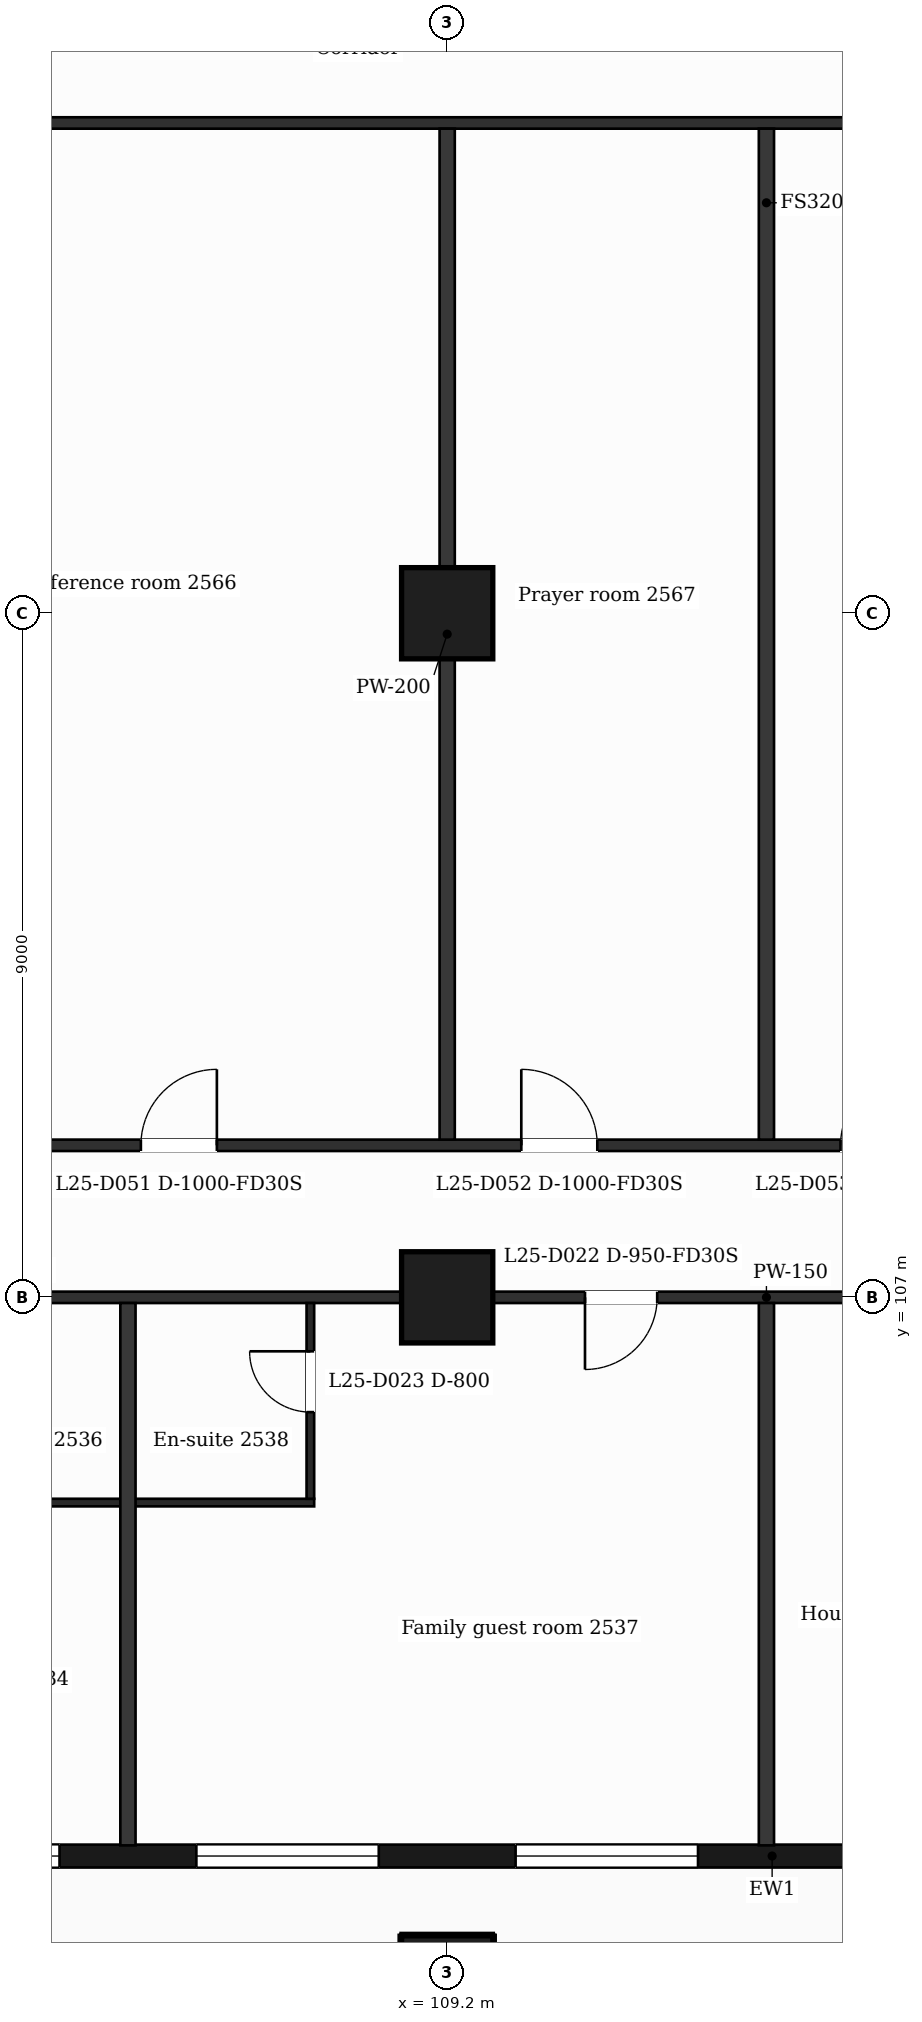
"""IFC4 building model, lengths in metres.
Left out: names, types, materials, properties, quantities, classifications, styles, units other than length and angle.
Written with IfcOpenShell. Run it as: python <this file> out.ifc"""

import sys

from ifc_helpers import new_model, si_unit, direction, frame, frame_2d, origin, origin_2d, place, context, subcontext, project, spatial, rectangle, extrude, element, fill, save


model = new_model("IFC4")
c1 = context("Model", 3, precision=1e-05, world=origin(), true_north=direction((0.0, 1.0)))
c2 = subcontext(c1, "Body", "Model", "MODEL_VIEW")
j1 = project(units=[si_unit("LENGTHUNIT", "METRE"), si_unit("PLANEANGLEUNIT", "RADIAN")], contexts=[c1])
p1 = place(None, origin())
s1 = spatial("IfcSite", under=j1, at=p1, CompositionType="ELEMENT")
p2 = place(p1, origin())
s2 = spatial("IfcBuilding", under=s1, at=p2, CompositionType="ELEMENT")
p3 = place(p2, frame((0.0, 0.0, 109.5)))
s3 = spatial("IfcBuildingStorey", under=s2, at=p3, CompositionType="ELEMENT", Elevation=109.5)
for number, where, z_axis, x_axis in (
    (1, (109.2, 98.0, 0.0), (0.0, 0.0, 1.0), (1.0, 0.0, 0.0)),
    (2, (109.2, 107.0, 0.0), (0.0, 0.0, 1.0), (1.0, 0.0, 0.0)),
    (3, (109.2, 116.0, 0.0), (0.0, 0.0, 1.0), (1.0, 0.0, 0.0)),
):
    element("IfcColumn", number, at=place(p3, frame(where, z_axis=z_axis, x_axis=x_axis)), inside=s3, PredefinedType="COLUMN", context=c2, shape_type="SweptSolid", body=[
        extrude(rectangle(XDim=1.2, YDim=1.2, at=origin_2d()), origin(), (0.0, 0.0, 1.0), 3.7),
    ])
p4 = place(p3, frame((89.85, 99.65, 0.0), z_axis=(0.0, 0.0, 1.0), x_axis=(1.0, 0.0, 0.0)))
e4 = element("IfcWall", 4, at=p4, inside=s3, PredefinedType="SOLIDWALL", context=c2, shape_type="SweptSolid", body=[
    extrude(rectangle(XDim=47.25, YDim=0.3, at=frame_2d((23.625, 0.0))), origin(), (0.0, 0.0, 1.0), 3.38),
])
p5 = place(p4, frame((0.725, 0.0, 0.9)))
e5 = element("IfcOpeningElement", 5, at=p5, cuts=e4, PredefinedType="OPENING", context=c2, shape_type="SweptSolid", body=[
    extrude(rectangle(XDim=1.2, YDim=2.1, at=frame_2d((0.6, 1.05))), frame((0.0, 0.16, 0.0), z_axis=(0.0, -1.0, 0.0), x_axis=(1.0, 0.0, 0.0)), (0.0, 0.0, 1.0), 0.32),
])
p6 = place(p4, frame((3.45, 0.0, 0.9)))
e6 = element("IfcOpeningElement", 6, at=p6, cuts=e4, PredefinedType="OPENING", context=c2, shape_type="SweptSolid", body=[
    extrude(rectangle(XDim=2.4, YDim=2.1, at=frame_2d((1.2, 1.05))), frame((0.0, 0.16, 0.0), z_axis=(0.0, -1.0, 0.0), x_axis=(1.0, 0.0, 0.0)), (0.0, 0.0, 1.0), 0.32),
])
p7 = place(p4, frame((7.65, 0.0, 0.9)))
e7 = element("IfcOpeningElement", 7, at=p7, cuts=e4, PredefinedType="OPENING", context=c2, shape_type="SweptSolid", body=[
    extrude(rectangle(XDim=2.4, YDim=2.1, at=frame_2d((1.2, 1.05))), frame((0.0, 0.16, 0.0), z_axis=(0.0, -1.0, 0.0), x_axis=(1.0, 0.0, 0.0)), (0.0, 0.0, 1.0), 0.32),
])
p8 = place(p4, frame((11.85, 0.0, 0.9)))
e8 = element("IfcOpeningElement", 8, at=p8, cuts=e4, PredefinedType="OPENING", context=c2, shape_type="SweptSolid", body=[
    extrude(rectangle(XDim=2.4, YDim=2.1, at=frame_2d((1.2, 1.05))), frame((0.0, 0.16, 0.0), z_axis=(0.0, -1.0, 0.0), x_axis=(1.0, 0.0, 0.0)), (0.0, 0.0, 1.0), 0.32),
])
p9 = place(p4, frame((16.05, 0.0, 0.9)))
e9 = element("IfcOpeningElement", 9, at=p9, cuts=e4, PredefinedType="OPENING", context=c2, shape_type="SweptSolid", body=[
    extrude(rectangle(XDim=2.4, YDim=2.1, at=frame_2d((1.2, 1.05))), frame((0.0, 0.16, 0.0), z_axis=(0.0, -1.0, 0.0), x_axis=(1.0, 0.0, 0.0)), (0.0, 0.0, 1.0), 0.32),
])
p10 = place(p4, frame((20.25, 0.0, 0.9)))
e10 = element("IfcOpeningElement", 10, at=p10, cuts=e4, PredefinedType="OPENING", context=c2, shape_type="SweptSolid", body=[
    extrude(rectangle(XDim=2.4, YDim=2.1, at=frame_2d((1.2, 1.05))), frame((0.0, 0.16, 0.0), z_axis=(0.0, -1.0, 0.0), x_axis=(1.0, 0.0, 0.0)), (0.0, 0.0, 1.0), 0.32),
])
p11 = place(p4, frame((25.05, 0.0, 0.9)))
e11 = element("IfcOpeningElement", 11, at=p11, cuts=e4, PredefinedType="OPENING", context=c2, shape_type="SweptSolid", body=[
    extrude(rectangle(XDim=1.2, YDim=2.1, at=frame_2d((0.6, 1.05))), frame((0.0, 0.16, 0.0), z_axis=(0.0, -1.0, 0.0), x_axis=(1.0, 0.0, 0.0)), (0.0, 0.0, 1.0), 0.32),
])
p12 = place(p4, frame((29.25, 0.0, 0.9)))
e12 = element("IfcOpeningElement", 12, at=p12, cuts=e4, PredefinedType="OPENING", context=c2, shape_type="SweptSolid", body=[
    extrude(rectangle(XDim=1.2, YDim=2.1, at=frame_2d((0.6, 1.05))), frame((0.0, 0.16, 0.0), z_axis=(0.0, -1.0, 0.0), x_axis=(1.0, 0.0, 0.0)), (0.0, 0.0, 1.0), 0.32),
])
p13 = place(p4, frame((32.55, 0.0, 0.0)))
e13 = element("IfcOpeningElement", 13, at=p13, cuts=e4, PredefinedType="OPENING", context=c2, shape_type="SweptSolid", body=[
    extrude(rectangle(XDim=1.2, YDim=2.4, at=frame_2d((0.6, 1.2))), frame((0.0, 0.16, 0.0), z_axis=(0.0, -1.0, 0.0), x_axis=(1.0, 0.0, 0.0)), (0.0, 0.0, 1.0), 0.32),
])
p14 = place(p4, frame((34.35, 0.0, 0.9)))
e14 = element("IfcOpeningElement", 14, at=p14, cuts=e4, PredefinedType="OPENING", context=c2, shape_type="SweptSolid", body=[
    extrude(rectangle(XDim=1.2, YDim=2.1, at=frame_2d((0.6, 1.05))), frame((0.0, 0.16, 0.0), z_axis=(0.0, -1.0, 0.0), x_axis=(1.0, 0.0, 0.0)), (0.0, 0.0, 1.0), 0.32),
])
p15 = place(p4, frame((37.05, 0.0, 0.9)))
e15 = element("IfcOpeningElement", 15, at=p15, cuts=e4, PredefinedType="OPENING", context=c2, shape_type="SweptSolid", body=[
    extrude(rectangle(XDim=2.4, YDim=2.1, at=frame_2d((1.2, 1.05))), frame((0.0, 0.16, 0.0), z_axis=(0.0, -1.0, 0.0), x_axis=(1.0, 0.0, 0.0)), (0.0, 0.0, 1.0), 0.32),
])
p16 = place(p4, frame((40.95, 0.0, 0.0)))
e16 = element("IfcOpeningElement", 16, at=p16, cuts=e4, PredefinedType="OPENING", context=c2, shape_type="SweptSolid", body=[
    extrude(rectangle(XDim=1.2, YDim=2.4, at=frame_2d((0.6, 1.2))), frame((0.0, 0.16, 0.0), z_axis=(0.0, -1.0, 0.0), x_axis=(1.0, 0.0, 0.0)), (0.0, 0.0, 1.0), 0.32),
])
p17 = place(p4, frame((42.75, 0.0, 0.9)))
e17 = element("IfcOpeningElement", 17, at=p17, cuts=e4, PredefinedType="OPENING", context=c2, shape_type="SweptSolid", body=[
    extrude(rectangle(XDim=1.2, YDim=2.1, at=frame_2d((0.6, 1.05))), frame((0.0, 0.16, 0.0), z_axis=(0.0, -1.0, 0.0), x_axis=(1.0, 0.0, 0.0)), (0.0, 0.0, 1.0), 0.32),
])
p18 = place(p4, frame((45.25, 0.0, 0.9)))
e18 = element("IfcOpeningElement", 18, at=p18, cuts=e4, PredefinedType="OPENING", context=c2, shape_type="SweptSolid", body=[
    extrude(rectangle(XDim=1.2, YDim=2.1, at=frame_2d((0.6, 1.05))), frame((0.0, 0.16, 0.0), z_axis=(0.0, -1.0, 0.0), x_axis=(1.0, 0.0, 0.0)), (0.0, 0.0, 1.0), 0.32),
])
p19 = place(p3, frame((102.55, 104.3, 0.0), z_axis=(0.0, 0.0, 1.0), x_axis=(1.0, 0.0, 0.0)))
e19 = element("IfcWall", 19, at=p19, inside=s3, PredefinedType="PARTITIONING", context=c2, shape_type="SweptSolid", body=[
    extrude(rectangle(XDim=4.9, YDim=0.1, at=frame_2d((2.45, 0.0))), origin(), (0.0, 0.0, 1.0), 3.38),
])
p20 = place(p3, frame((87.018, 107.0, 0.0), z_axis=(0.0, 0.0, 1.0), x_axis=(1.0, 0.0, 0.0)))
e20 = element("IfcWall", 20, at=p20, inside=s3, PredefinedType="PARTITIONING", context=c2, shape_type="SweptSolid", body=[
    extrude(rectangle(XDim=52.765, YDim=0.15, at=frame_2d((26.382, 0.0))), origin(), (0.0, 0.0, 1.0), 3.38),
])
p21 = place(p20, frame((1.032, 0.0, 0.0)))
e21 = element("IfcOpeningElement", 21, at=p21, cuts=e20, PredefinedType="OPENING", context=c2, shape_type="SweptSolid", body=[
    extrude(rectangle(XDim=0.95, YDim=2.1, at=frame_2d((0.475, 1.05))), frame((0.0, 0.085, 0.0), z_axis=(0.0, -1.0, 0.0), x_axis=(1.0, 0.0, 0.0)), (0.0, 0.0, 1.0), 0.17),
])
p22 = place(p20, frame((9.752, 0.0, 0.0)))
e22 = element("IfcOpeningElement", 22, at=p22, cuts=e20, PredefinedType="OPENING", context=c2, shape_type="SweptSolid", body=[
    extrude(rectangle(XDim=1.0, YDim=2.1, at=frame_2d((0.5, 1.05))), frame((0.0, 0.085, 0.0), z_axis=(0.0, -1.0, 0.0), x_axis=(1.0, 0.0, 0.0)), (0.0, 0.0, 1.0), 0.17),
])
p23 = place(p20, frame((23.995, 0.0, 0.0)))
e23 = element("IfcOpeningElement", 23, at=p23, cuts=e20, PredefinedType="OPENING", context=c2, shape_type="SweptSolid", body=[
    extrude(rectangle(XDim=0.95, YDim=2.1, at=frame_2d((0.475, 1.05))), frame((0.0, 0.085, 0.0), z_axis=(0.0, -1.0, 0.0), x_axis=(1.0, 0.0, 0.0)), (0.0, 0.0, 1.0), 0.17),
])
p24 = place(p20, frame((28.645, 0.0, 0.0)))
e24 = element("IfcOpeningElement", 24, at=p24, cuts=e20, PredefinedType="OPENING", context=c2, shape_type="SweptSolid", body=[
    extrude(rectangle(XDim=0.95, YDim=2.1, at=frame_2d((0.475, 1.05))), frame((0.0, 0.085, 0.0), z_axis=(0.0, -1.0, 0.0), x_axis=(1.0, 0.0, 0.0)), (0.0, 0.0, 1.0), 0.17),
])
p25 = place(p20, frame((36.632, 0.0, 0.0)))
e25 = element("IfcOpeningElement", 25, at=p25, cuts=e20, PredefinedType="OPENING", context=c2, shape_type="SweptSolid", body=[
    extrude(rectangle(XDim=1.0, YDim=2.1, at=frame_2d((0.5, 1.05))), frame((0.0, 0.085, 0.0), z_axis=(0.0, -1.0, 0.0), x_axis=(1.0, 0.0, 0.0)), (0.0, 0.0, 1.0), 0.17),
])
p26 = place(p20, frame((41.957, 0.0, 0.0)))
e26 = element("IfcOpeningElement", 26, at=p26, cuts=e20, PredefinedType="OPENING", context=c2, shape_type="SweptSolid", body=[
    extrude(rectangle(XDim=0.95, YDim=2.1, at=frame_2d((0.475, 1.05))), frame((0.0, 0.085, 0.0), z_axis=(0.0, -1.0, 0.0), x_axis=(1.0, 0.0, 0.0)), (0.0, 0.0, 1.0), 0.17),
])
p27 = place(p20, frame((45.607, 0.0, 0.0)))
e27 = element("IfcOpeningElement", 27, at=p27, cuts=e20, PredefinedType="OPENING", context=c2, shape_type="SweptSolid", body=[
    extrude(rectangle(XDim=0.95, YDim=2.1, at=frame_2d((0.475, 1.05))), frame((0.0, 0.085, 0.0), z_axis=(0.0, -1.0, 0.0), x_axis=(1.0, 0.0, 0.0)), (0.0, 0.0, 1.0), 0.17),
])
p28 = place(p20, frame((48.767, 0.0, 0.0)))
e28 = element("IfcOpeningElement", 28, at=p28, cuts=e20, PredefinedType="OPENING", context=c2, shape_type="SweptSolid", body=[
    extrude(rectangle(XDim=0.95, YDim=2.1, at=frame_2d((0.475, 1.05))), frame((0.0, 0.085, 0.0), z_axis=(0.0, -1.0, 0.0), x_axis=(1.0, 0.0, 0.0)), (0.0, 0.0, 1.0), 0.17),
])
p29 = place(p3, frame((100.725, 109.0, 0.0), z_axis=(0.0, 0.0, 1.0), x_axis=(1.0, 0.0, 0.0)))
e29 = element("IfcWall", 29, at=p29, inside=s3, PredefinedType="PARTITIONING", context=c2, shape_type="SweptSolid", body=[
    extrude(rectangle(XDim=25.35, YDim=0.15, at=frame_2d((12.675, 0.0))), origin(), (0.0, 0.0, 1.0), 3.38),
])
p30 = place(p29, frame((4.445, 0.0, 0.0)))
e30 = element("IfcOpeningElement", 30, at=p30, cuts=e29, PredefinedType="OPENING", context=c2, shape_type="SweptSolid", body=[
    extrude(rectangle(XDim=1.0, YDim=2.1, at=frame_2d((0.5, 1.05))), frame((0.0, 0.085, 0.0), z_axis=(0.0, -1.0, 0.0), x_axis=(1.0, 0.0, 0.0)), (0.0, 0.0, 1.0), 0.17),
])
p31 = place(p29, frame((9.45, 0.0, 0.0)))
e31 = element("IfcOpeningElement", 31, at=p31, cuts=e29, PredefinedType="OPENING", context=c2, shape_type="SweptSolid", body=[
    extrude(rectangle(XDim=1.0, YDim=2.1, at=frame_2d((0.5, 1.05))), frame((0.0, 0.085, 0.0), z_axis=(0.0, -1.0, 0.0), x_axis=(1.0, 0.0, 0.0)), (0.0, 0.0, 1.0), 0.17),
])
p32 = place(p29, frame((13.65, 0.0, 0.0)))
e32 = element("IfcOpeningElement", 32, at=p32, cuts=e29, PredefinedType="OPENING", context=c2, shape_type="SweptSolid", body=[
    extrude(rectangle(XDim=1.0, YDim=2.1, at=frame_2d((0.5, 1.05))), frame((0.0, 0.085, 0.0), z_axis=(0.0, -1.0, 0.0), x_axis=(1.0, 0.0, 0.0)), (0.0, 0.0, 1.0), 0.17),
])
p33 = place(p29, frame((19.1, 0.0, 0.0)))
e33 = element("IfcOpeningElement", 33, at=p33, cuts=e29, PredefinedType="OPENING", context=c2, shape_type="SweptSolid", body=[
    extrude(rectangle(XDim=1.0, YDim=2.1, at=frame_2d((0.5, 1.05))), frame((0.0, 0.085, 0.0), z_axis=(0.0, -1.0, 0.0), x_axis=(1.0, 0.0, 0.0)), (0.0, 0.0, 1.0), 0.17),
])
p34 = place(p29, frame((22.05, 0.0, 0.0)))
e34 = element("IfcOpeningElement", 34, at=p34, cuts=e29, PredefinedType="OPENING", context=c2, shape_type="SweptSolid", body=[
    extrude(rectangle(XDim=1.0, YDim=2.1, at=frame_2d((0.5, 1.05))), frame((0.0, 0.085, 0.0), z_axis=(0.0, -1.0, 0.0), x_axis=(1.0, 0.0, 0.0)), (0.0, 0.0, 1.0), 0.17),
])
p35 = place(p3, frame((100.8, 122.45, 0.0), z_axis=(0.0, 0.0, 1.0), x_axis=(1.0, 0.0, 0.0)))
e35 = element("IfcWall", 35, at=p35, inside=s3, PredefinedType="PARTITIONING", context=c2, shape_type="SweptSolid", body=[
    extrude(rectangle(XDim=25.2, YDim=0.15, at=frame_2d((12.6, 0.0))), origin(), (0.0, 0.0, 1.0), 3.38),
])
p36 = place(p3, frame((105.0, 99.79, 0.0), z_axis=(0.0, 0.0, 1.0), x_axis=(0.0, 1.0, 0.0)))
e36 = element("IfcWall", 36, at=p36, inside=s3, PredefinedType="PARTITIONING", context=c2, shape_type="SweptSolid", body=[
    extrude(rectangle(XDim=7.135, YDim=0.2, at=frame_2d((3.567, 0.0))), origin(), (0.0, 0.0, 1.0), 3.38),
])
p37 = place(p3, frame((107.4, 104.35, 0.0), z_axis=(0.0, 0.0, 1.0), x_axis=(0.0, 1.0, 0.0)))
e37 = element("IfcWall", 37, at=p37, inside=s3, PredefinedType="PARTITIONING", context=c2, shape_type="SweptSolid", body=[
    extrude(rectangle(XDim=2.575, YDim=0.1, at=frame_2d((1.288, 0.0))), origin(), (0.0, 0.0, 1.0), 3.38),
])
p38 = place(p37, frame((1.14, 0.0, 0.0)))
e38 = element("IfcOpeningElement", 38, at=p38, cuts=e37, PredefinedType="OPENING", context=c2, shape_type="SweptSolid", body=[
    extrude(rectangle(XDim=0.8, YDim=2.1, at=frame_2d((0.4, 1.05))), frame((0.0, 0.06, 0.0), z_axis=(0.0, -1.0, 0.0), x_axis=(1.0, 0.0, 0.0)), (0.0, 0.0, 1.0), 0.12),
])
p39 = place(p3, frame((109.2, 109.075, 0.0), z_axis=(0.0, 0.0, 1.0), x_axis=(0.0, 1.0, 0.0)))
e39 = element("IfcWall", 39, at=p39, inside=s3, PredefinedType="PARTITIONING", context=c2, shape_type="SweptSolid", body=[
    extrude(rectangle(XDim=13.3, YDim=0.2, at=frame_2d((6.65, 0.0))), origin(), (0.0, 0.0, 1.0), 3.38),
])
p40 = place(p3, frame((113.4, 99.79, 0.0), z_axis=(0.0, 0.0, 1.0), x_axis=(0.0, 1.0, 0.0)))
e40 = element("IfcWall", 40, at=p40, inside=s3, PredefinedType="PARTITIONING", context=c2, shape_type="SweptSolid", body=[
    extrude(rectangle(XDim=7.135, YDim=0.2, at=frame_2d((3.567, 0.0))), origin(), (0.0, 0.0, 1.0), 3.38),
])
p41 = place(p3, frame((113.4, 109.075, 0.0), z_axis=(0.0, 0.0, 1.0), x_axis=(0.0, 1.0, 0.0)))
e41 = element("IfcWall", 41, at=p41, inside=s3, PredefinedType="PARTITIONING", context=c2, shape_type="SweptSolid", body=[
    extrude(rectangle(XDim=13.3, YDim=0.2, at=frame_2d((6.65, 0.0))), origin(), (0.0, 0.0, 1.0), 3.38),
])
p42 = place(p8, origin())
e42 = element("IfcWindow", 42, at=p42, inside=s3, PartitioningType="SINGLE_PANEL", PredefinedType="WINDOW", context=c2, shape_type="SweptSolid", body=[
    extrude(rectangle(XDim=2.4, YDim=2.1, at=frame_2d((1.2, 1.05))), frame((0.0, 0.03, 0.0), z_axis=(0.0, -1.0, 0.0), x_axis=(1.0, 0.0, 0.0)), (0.0, 0.0, 1.0), 0.06),
])
fill(e8, e42)
p43 = place(p9, origin())
e43 = element("IfcWindow", 43, at=p43, inside=s3, PartitioningType="SINGLE_PANEL", PredefinedType="WINDOW", context=c2, shape_type="SweptSolid", body=[
    extrude(rectangle(XDim=2.4, YDim=2.1, at=frame_2d((1.2, 1.05))), frame((0.0, 0.03, 0.0), z_axis=(0.0, -1.0, 0.0), x_axis=(1.0, 0.0, 0.0)), (0.0, 0.0, 1.0), 0.06),
])
fill(e9, e43)
p44 = place(p10, origin())
e44 = element("IfcWindow", 44, at=p44, inside=s3, PartitioningType="SINGLE_PANEL", PredefinedType="WINDOW", context=c2, shape_type="SweptSolid", body=[
    extrude(rectangle(XDim=2.4, YDim=2.1, at=frame_2d((1.2, 1.05))), frame((0.0, 0.03, 0.0), z_axis=(0.0, -1.0, 0.0), x_axis=(1.0, 0.0, 0.0)), (0.0, 0.0, 1.0), 0.06),
])
fill(e10, e44)
p45 = place(p23, origin())
e45 = element("IfcDoor", 45, at=p45, inside=s3, OperationType="SINGLE_SWING_LEFT", PredefinedType="DOOR", context=c2, shape_type="SweptSolid", body=[
    extrude(rectangle(XDim=0.95, YDim=2.1, at=frame_2d((0.475, 1.05))), frame((0.0, 0.025, 0.0), z_axis=(0.0, -1.0, 0.0), x_axis=(1.0, 0.0, 0.0)), (0.0, 0.0, 1.0), 0.05),
])
fill(e23, e45)
p46 = place(p38, origin())
e46 = element("IfcDoor", 46, at=p46, inside=s3, OperationType="SINGLE_SWING_RIGHT", PredefinedType="DOOR", context=c2, shape_type="SweptSolid", body=[
    extrude(rectangle(XDim=0.8, YDim=2.1, at=frame_2d((0.4, 1.05))), frame((0.0, 0.025, 0.0), z_axis=(0.0, -1.0, 0.0), x_axis=(1.0, 0.0, 0.0)), (0.0, 0.0, 1.0), 0.05),
])
fill(e38, e46)
p47 = place(p30, origin())
e47 = element("IfcDoor", 47, at=p47, inside=s3, OperationType="SINGLE_SWING_RIGHT", PredefinedType="DOOR", context=c2, shape_type="SweptSolid", body=[
    extrude(rectangle(XDim=1.0, YDim=2.1, at=frame_2d((0.5, 1.05))), frame((0.0, 0.025, 0.0), z_axis=(0.0, -1.0, 0.0), x_axis=(1.0, 0.0, 0.0)), (0.0, 0.0, 1.0), 0.05),
])
fill(e30, e47)
p48 = place(p31, origin())
e48 = element("IfcDoor", 48, at=p48, inside=s3, OperationType="SINGLE_SWING_LEFT", PredefinedType="DOOR", context=c2, shape_type="SweptSolid", body=[
    extrude(rectangle(XDim=1.0, YDim=2.1, at=frame_2d((0.5, 1.05))), frame((0.0, 0.025, 0.0), z_axis=(0.0, -1.0, 0.0), x_axis=(1.0, 0.0, 0.0)), (0.0, 0.0, 1.0), 0.05),
])
fill(e31, e48)
p49 = place(p32, origin())
e49 = element("IfcDoor", 49, at=p49, inside=s3, OperationType="SINGLE_SWING_RIGHT", PredefinedType="DOOR", context=c2, shape_type="SweptSolid", body=[
    extrude(rectangle(XDim=1.0, YDim=2.1, at=frame_2d((0.5, 1.05))), frame((0.0, 0.025, 0.0), z_axis=(0.0, -1.0, 0.0), x_axis=(1.0, 0.0, 0.0)), (0.0, 0.0, 1.0), 0.05),
])
fill(e32, e49)
save(model, sys.argv[1])
